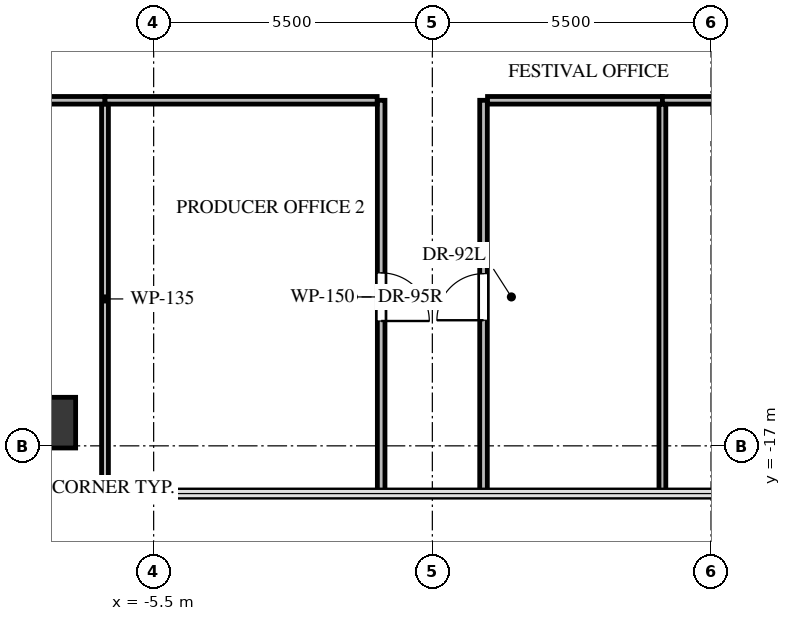
"""IFC4 building model, lengths in metres.
Left out: names, types, materials, properties, quantities, classifications, styles, units other than length and angle.
Written with IfcOpenShell. Run it as: python <this file> out.ifc"""

import sys

from ifc_helpers import new_model, si_unit, direction, frame, frame_2d, origin, origin_2d, place, context, subcontext, project, spatial, rectangle, extrude, source, transform, mapped, element, fill, save


model = new_model("IFC4")
c1 = context("Model", 3, precision=1e-05, world=origin(), true_north=direction((0.0, 1.0)))
c2 = subcontext(c1, "Body", "Model", "MODEL_VIEW")
j1 = project(units=[si_unit("LENGTHUNIT", "METRE"), si_unit("PLANEANGLEUNIT", "RADIAN")], contexts=[c1])
p1 = place(None, origin())
s1 = spatial("IfcSite", under=j1, at=p1, CompositionType="ELEMENT")
p2 = place(p1, origin())
s2 = spatial("IfcBuilding", under=s1, at=p2, CompositionType="ELEMENT")
p3 = place(p2, frame((0.0, 0.0, 177.1)))
s3 = spatial("IfcBuildingStorey", under=s2, at=p3, CompositionType="ELEMENT", Elevation=177.1)
m1 = source(origin(), c2, "Body", "SweptSolid", [
    extrude(rectangle(XDim=1.0, YDim=1.0, at=origin_2d()), origin(), (0.0, 0.0, 1.0), 3.3),
])
p4 = place(p3, frame((-7.54, -16.542, -0.24), z_axis=(0.0, 0.0, 1.0), x_axis=(1.0, 0.0, 0.0)))
e1 = element("IfcColumn", 1, at=p4, inside=s3, PredefinedType="COLUMN", context=c2, shape_type="MappedRepresentation", body=[
    mapped(m1, transform((0.0, 0.0, 0.0), x_axis=(1.0, 0.0, 0.0), y_axis=(0.0, 1.0, 0.0), z_axis=(0.0, 0.0, 1.0), scale=1.0)),
])
p5 = place(p3, frame((-12.04, -10.18, 0.0), z_axis=(0.0, 0.0, 1.0), x_axis=(1.0, 0.0, 0.0)))
e2 = element("IfcWall", 2, at=p5, inside=s3, PredefinedType="PARTITIONING", context=c2, shape_type="SweptSolid", body=[
    extrude(rectangle(XDim=5.58, YDim=0.15, at=frame_2d((2.79, 0.0))), origin(), (0.0, 0.0, 1.0), 3.045),
])
p6 = place(p5, frame((0.35, 0.0, 0.0)))
e3 = element("IfcOpeningElement", 3, at=p6, cuts=e2, PredefinedType="OPENING", context=c2, shape_type="SweptSolid", body=[
    extrude(rectangle(XDim=0.92, YDim=2.1, at=frame_2d((0.46, 1.05))), frame((0.0, 0.085, 0.0), z_axis=(0.0, -1.0, 0.0), x_axis=(1.0, 0.0, 0.0)), (0.0, 0.0, 1.0), 0.17),
])
p7 = place(p3, frame((-1.01, -10.18, 0.0), z_axis=(0.0, 0.0, 1.0), x_axis=(0.0, -1.0, 0.0)))
e4 = element("IfcWall", 4, at=p7, inside=s3, PredefinedType="PARTITIONING", context=c2, shape_type="SweptSolid", body=[
    extrude(rectangle(XDim=7.762, YDim=0.15, at=frame_2d((3.881, 0.0))), origin(), (0.0, 0.0, 1.0), 2.399),
])
p8 = place(p7, frame((3.406, 0.0, 0.0)))
e5 = element("IfcOpeningElement", 5, at=p8, cuts=e4, PredefinedType="OPENING", context=c2, shape_type="SweptSolid", body=[
    extrude(rectangle(XDim=0.95, YDim=2.1, at=frame_2d((0.475, 1.05))), frame((0.0, 0.085, 0.0), z_axis=(0.0, -1.0, 0.0), x_axis=(1.0, 0.0, 0.0)), (0.0, 0.0, 1.0), 0.17),
])
p9 = place(p3, frame((-6.46, -10.18, 0.0), z_axis=(0.0, 0.0, 1.0), x_axis=(1.0, 0.0, 0.0)))
e6 = element("IfcWall", 6, at=p9, inside=s3, PredefinedType="PARTITIONING", context=c2, shape_type="SweptSolid", body=[
    extrude(rectangle(XDim=5.371, YDim=0.15, at=frame_2d((2.686, 0.0))), origin(), (0.0, 0.0, 1.0), 2.242),
])
p10 = place(p3, frame((1.01, -17.942, 0.0), z_axis=(0.0, 0.0, 1.0), x_axis=(0.0, 1.0, 0.0)))
e7 = element("IfcWall", 7, at=p10, inside=s3, PredefinedType="PARTITIONING", context=c2, shape_type="SweptSolid", body=[
    extrude(rectangle(XDim=7.762, YDim=0.15, at=frame_2d((3.881, 0.0))), origin(), (0.0, 0.0, 1.0), 2.399),
])
p11 = place(p10, frame((3.421, 0.0, 0.0)))
e8 = element("IfcOpeningElement", 8, at=p11, cuts=e7, PredefinedType="OPENING", context=c2, shape_type="SweptSolid", body=[
    extrude(rectangle(XDim=0.92, YDim=2.1, at=frame_2d((0.46, 1.05))), frame((0.0, 0.085, 0.0), z_axis=(0.0, -1.0, 0.0), x_axis=(1.0, 0.0, 0.0)), (0.0, 0.0, 1.0), 0.17),
])
p12 = place(p3, frame((1.089, -10.18, 0.0), z_axis=(0.0, 0.0, 1.0), x_axis=(1.0, 0.0, 0.0)))
e9 = element("IfcWall", 9, at=p12, inside=s3, PredefinedType="PARTITIONING", context=c2, shape_type="SweptSolid", body=[
    extrude(rectangle(XDim=3.451, YDim=0.15, at=frame_2d((1.726, 0.0))), origin(), (0.0, 0.0, 1.0), 2.242),
])
p13 = place(p3, frame((4.54, -10.18, 0.0), z_axis=(0.0, 0.0, 1.0), x_axis=(1.0, 0.0, 0.0)))
e10 = element("IfcWall", 10, at=p13, inside=s3, PredefinedType="PARTITIONING", context=c2, shape_type="SweptSolid", body=[
    extrude(rectangle(XDim=5.5, YDim=0.15, at=frame_2d((2.75, 0.0))), origin(), (0.0, 0.0, 1.0), 2.242),
])
p14 = place(p13, frame((2.3, 0.0, 0.0)))
e11 = element("IfcOpeningElement", 11, at=p14, cuts=e10, PredefinedType="OPENING", context=c2, shape_type="SweptSolid", body=[
    extrude(rectangle(XDim=0.9, YDim=2.05, at=frame_2d((0.45, 1.025))), frame((0.0, 0.085, 0.0), z_axis=(0.0, -1.0, 0.0), x_axis=(1.0, 0.0, 0.0)), (0.0, 0.0, 1.0), 0.17),
])
p15 = place(p3, frame((-6.46, -10.259, 0.0), z_axis=(0.0, 0.0, 1.0), x_axis=(0.0, -1.0, 0.0)))
e12 = element("IfcWall", 12, at=p15, inside=s3, PredefinedType="PARTITIONING", context=c2, shape_type="SweptSolid", body=[
    extrude(rectangle(XDim=7.683, YDim=0.135, at=frame_2d((3.841, 0.0))), origin(), (0.0, 0.0, 1.0), 2.242),
])
p16 = place(p3, frame((4.54, -10.259, 0.0), z_axis=(0.0, 0.0, 1.0), x_axis=(0.0, -1.0, 0.0)))
e13 = element("IfcWall", 13, at=p16, inside=s3, PredefinedType="PARTITIONING", context=c2, shape_type="SweptSolid", body=[
    extrude(rectangle(XDim=7.683, YDim=0.135, at=frame_2d((3.841, 0.0))), origin(), (0.0, 0.0, 1.0), 2.399),
])
m2 = source(origin(), c2, "Body", "SweptSolid", [
    extrude(rectangle(XDim=0.95, YDim=2.1, at=frame_2d((0.475, 1.05))), frame((0.0, 0.025, 0.0), z_axis=(0.0, -1.0, 0.0), x_axis=(1.0, 0.0, 0.0)), (0.0, 0.0, 1.0), 0.05),
])
p17 = place(p8, origin())
e14 = element("IfcDoor", 14, at=p17, inside=s3, OperationType="SINGLE_SWING_RIGHT", PredefinedType="DOOR", context=c2, shape_type="MappedRepresentation", body=[
    mapped(m2, transform((0.0, 0.0, 0.0), x_axis=(1.0, 0.0, 0.0), y_axis=(0.0, 1.0, 0.0), z_axis=(0.0, 0.0, 1.0), scale=1.0)),
])
fill(e5, e14)
m3 = source(origin(), c2, "Body", "SweptSolid", [
    extrude(rectangle(XDim=0.92, YDim=2.1, at=frame_2d((0.46, 1.05))), frame((0.0, 0.025, 0.0), z_axis=(0.0, -1.0, 0.0), x_axis=(1.0, 0.0, 0.0)), (0.0, 0.0, 1.0), 0.05),
])
p18 = place(p11, origin())
e15 = element("IfcDoor", 15, at=p18, inside=s3, OperationType="SINGLE_SWING_LEFT", PredefinedType="DOOR", context=c2, shape_type="MappedRepresentation", body=[
    mapped(m3, transform((0.0, 0.0, 0.0), x_axis=(1.0, 0.0, 0.0), y_axis=(0.0, 1.0, 0.0), z_axis=(0.0, 0.0, 1.0), scale=1.0)),
])
fill(e8, e15)
save(model, sys.argv[1])
